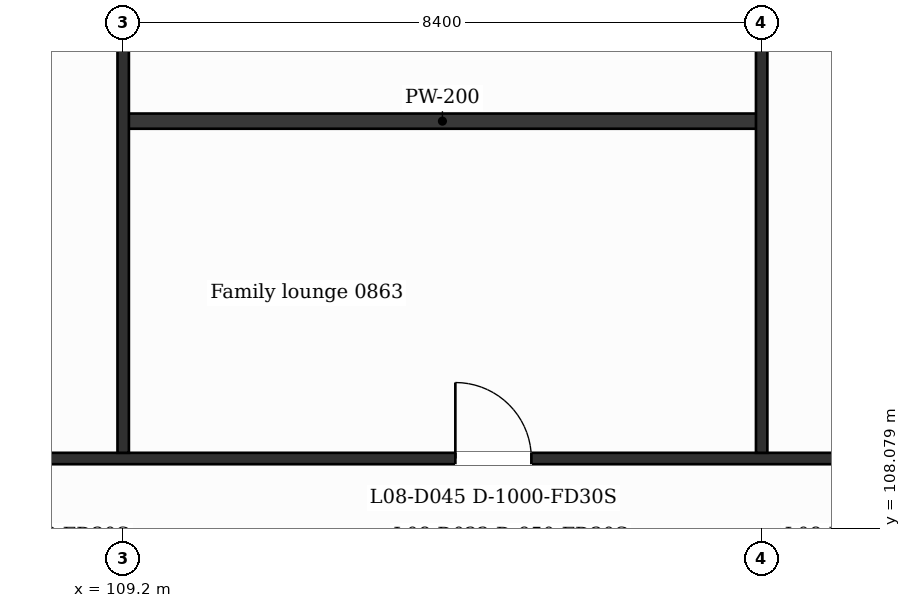
"""IFC4 building model, lengths in metres.
Left out: names, types, materials, properties, quantities, classifications, styles, units other than length and angle.
Written with IfcOpenShell. Run it as: python <this file> out.ifc"""

import sys

from ifc_helpers import new_model, si_unit, direction, frame, frame_2d, origin, place, context, subcontext, project, spatial, rectangle, extrude, element, fill, save


model = new_model("IFC4")
c1 = context("Model", 3, precision=1e-05, world=origin(), true_north=direction((0.0, 1.0)))
c2 = subcontext(c1, "Body", "Model", "MODEL_VIEW")
j1 = project(units=[si_unit("LENGTHUNIT", "METRE"), si_unit("PLANEANGLEUNIT", "RADIAN")], contexts=[c1])
p1 = place(None, origin())
s1 = spatial("IfcSite", under=j1, at=p1, CompositionType="ELEMENT")
p2 = place(p1, origin())
s2 = spatial("IfcBuilding", under=s1, at=p2, CompositionType="ELEMENT")
p3 = place(p2, frame((0.0, 0.0, 46.0)))
s3 = spatial("IfcBuildingStorey", under=s2, at=p3, CompositionType="ELEMENT", Elevation=46.0)
p4 = place(p3, frame((100.725, 109.0, 0.0), z_axis=(0.0, 0.0, 1.0), x_axis=(1.0, 0.0, 0.0)))
e1 = element("IfcWall", 1, at=p4, inside=s3, PredefinedType="PARTITIONING", context=c2, shape_type="SweptSolid", body=[
    extrude(rectangle(XDim=25.35, YDim=0.15, at=frame_2d((12.675, 0.0))), origin(), (0.0, 0.0, 1.0), 3.18),
])
p5 = place(p4, frame((1.2, 0.0, 0.0)))
e2 = element("IfcOpeningElement", 2, at=p5, cuts=e1, PredefinedType="OPENING", context=c2, shape_type="SweptSolid", body=[
    extrude(rectangle(XDim=1.0, YDim=2.1, at=frame_2d((0.5, 1.05))), frame((0.0, 0.085, 0.0), z_axis=(0.0, -1.0, 0.0), x_axis=(1.0, 0.0, 0.0)), (0.0, 0.0, 1.0), 0.17),
])
p6 = place(p4, frame((12.845, 0.0, 0.0)))
e3 = element("IfcOpeningElement", 3, at=p6, cuts=e1, PredefinedType="OPENING", context=c2, shape_type="SweptSolid", body=[
    extrude(rectangle(XDim=1.0, YDim=2.1, at=frame_2d((0.5, 1.05))), frame((0.0, 0.085, 0.0), z_axis=(0.0, -1.0, 0.0), x_axis=(1.0, 0.0, 0.0)), (0.0, 0.0, 1.0), 0.17),
])
p7 = place(p4, frame((23.15, 0.0, 0.0)))
e4 = element("IfcOpeningElement", 4, at=p7, cuts=e1, PredefinedType="OPENING", context=c2, shape_type="SweptSolid", body=[
    extrude(rectangle(XDim=1.0, YDim=2.1, at=frame_2d((0.5, 1.05))), frame((0.0, 0.085, 0.0), z_axis=(0.0, -1.0, 0.0), x_axis=(1.0, 0.0, 0.0)), (0.0, 0.0, 1.0), 0.17),
])
p8 = place(p3, frame((109.2, 113.438, 0.0), z_axis=(0.0, 0.0, 1.0), x_axis=(1.0, 0.0, 0.0)))
e5 = element("IfcWall", 5, at=p8, inside=s3, PredefinedType="PARTITIONING", context=c2, shape_type="SweptSolid", body=[
    extrude(rectangle(XDim=8.4, YDim=0.2, at=frame_2d((4.2, 0.0))), origin(), (0.0, 0.0, 1.0), 3.18),
])
p9 = place(p3, frame((109.2, 109.075, 0.0), z_axis=(0.0, 0.0, 1.0), x_axis=(0.0, 1.0, 0.0)))
e6 = element("IfcWall", 6, at=p9, inside=s3, PredefinedType="PARTITIONING", context=c2, shape_type="SweptSolid", body=[
    extrude(rectangle(XDim=13.3, YDim=0.15, at=frame_2d((6.65, 0.0))), origin(), (0.0, 0.0, 1.0), 3.18),
])
p10 = place(p3, frame((117.6, 109.075, 0.0), z_axis=(0.0, 0.0, 1.0), x_axis=(0.0, 1.0, 0.0)))
e7 = element("IfcWall", 7, at=p10, inside=s3, PredefinedType="PARTITIONING", context=c2, shape_type="SweptSolid", body=[
    extrude(rectangle(XDim=13.3, YDim=0.15, at=frame_2d((6.65, 0.0))), origin(), (0.0, 0.0, 1.0), 3.18),
])
p11 = place(p10, frame((9.1, 0.0, 0.0)))
e8 = element("IfcOpeningElement", 8, at=p11, cuts=e7, PredefinedType="OPENING", context=c2, shape_type="SweptSolid", body=[
    extrude(rectangle(XDim=1.0, YDim=2.1, at=frame_2d((0.5, 1.05))), frame((0.0, 0.085, 0.0), z_axis=(0.0, -1.0, 0.0), x_axis=(1.0, 0.0, 0.0)), (0.0, 0.0, 1.0), 0.17),
])
p12 = place(p6, origin())
e9 = element("IfcDoor", 9, at=p12, inside=s3, OperationType="SINGLE_SWING_LEFT", PredefinedType="DOOR", context=c2, shape_type="SweptSolid", body=[
    extrude(rectangle(XDim=1.0, YDim=2.1, at=frame_2d((0.5, 1.05))), frame((0.0, 0.025, 0.0), z_axis=(0.0, -1.0, 0.0), x_axis=(1.0, 0.0, 0.0)), (0.0, 0.0, 1.0), 0.05),
])
fill(e3, e9)
save(model, sys.argv[1])
